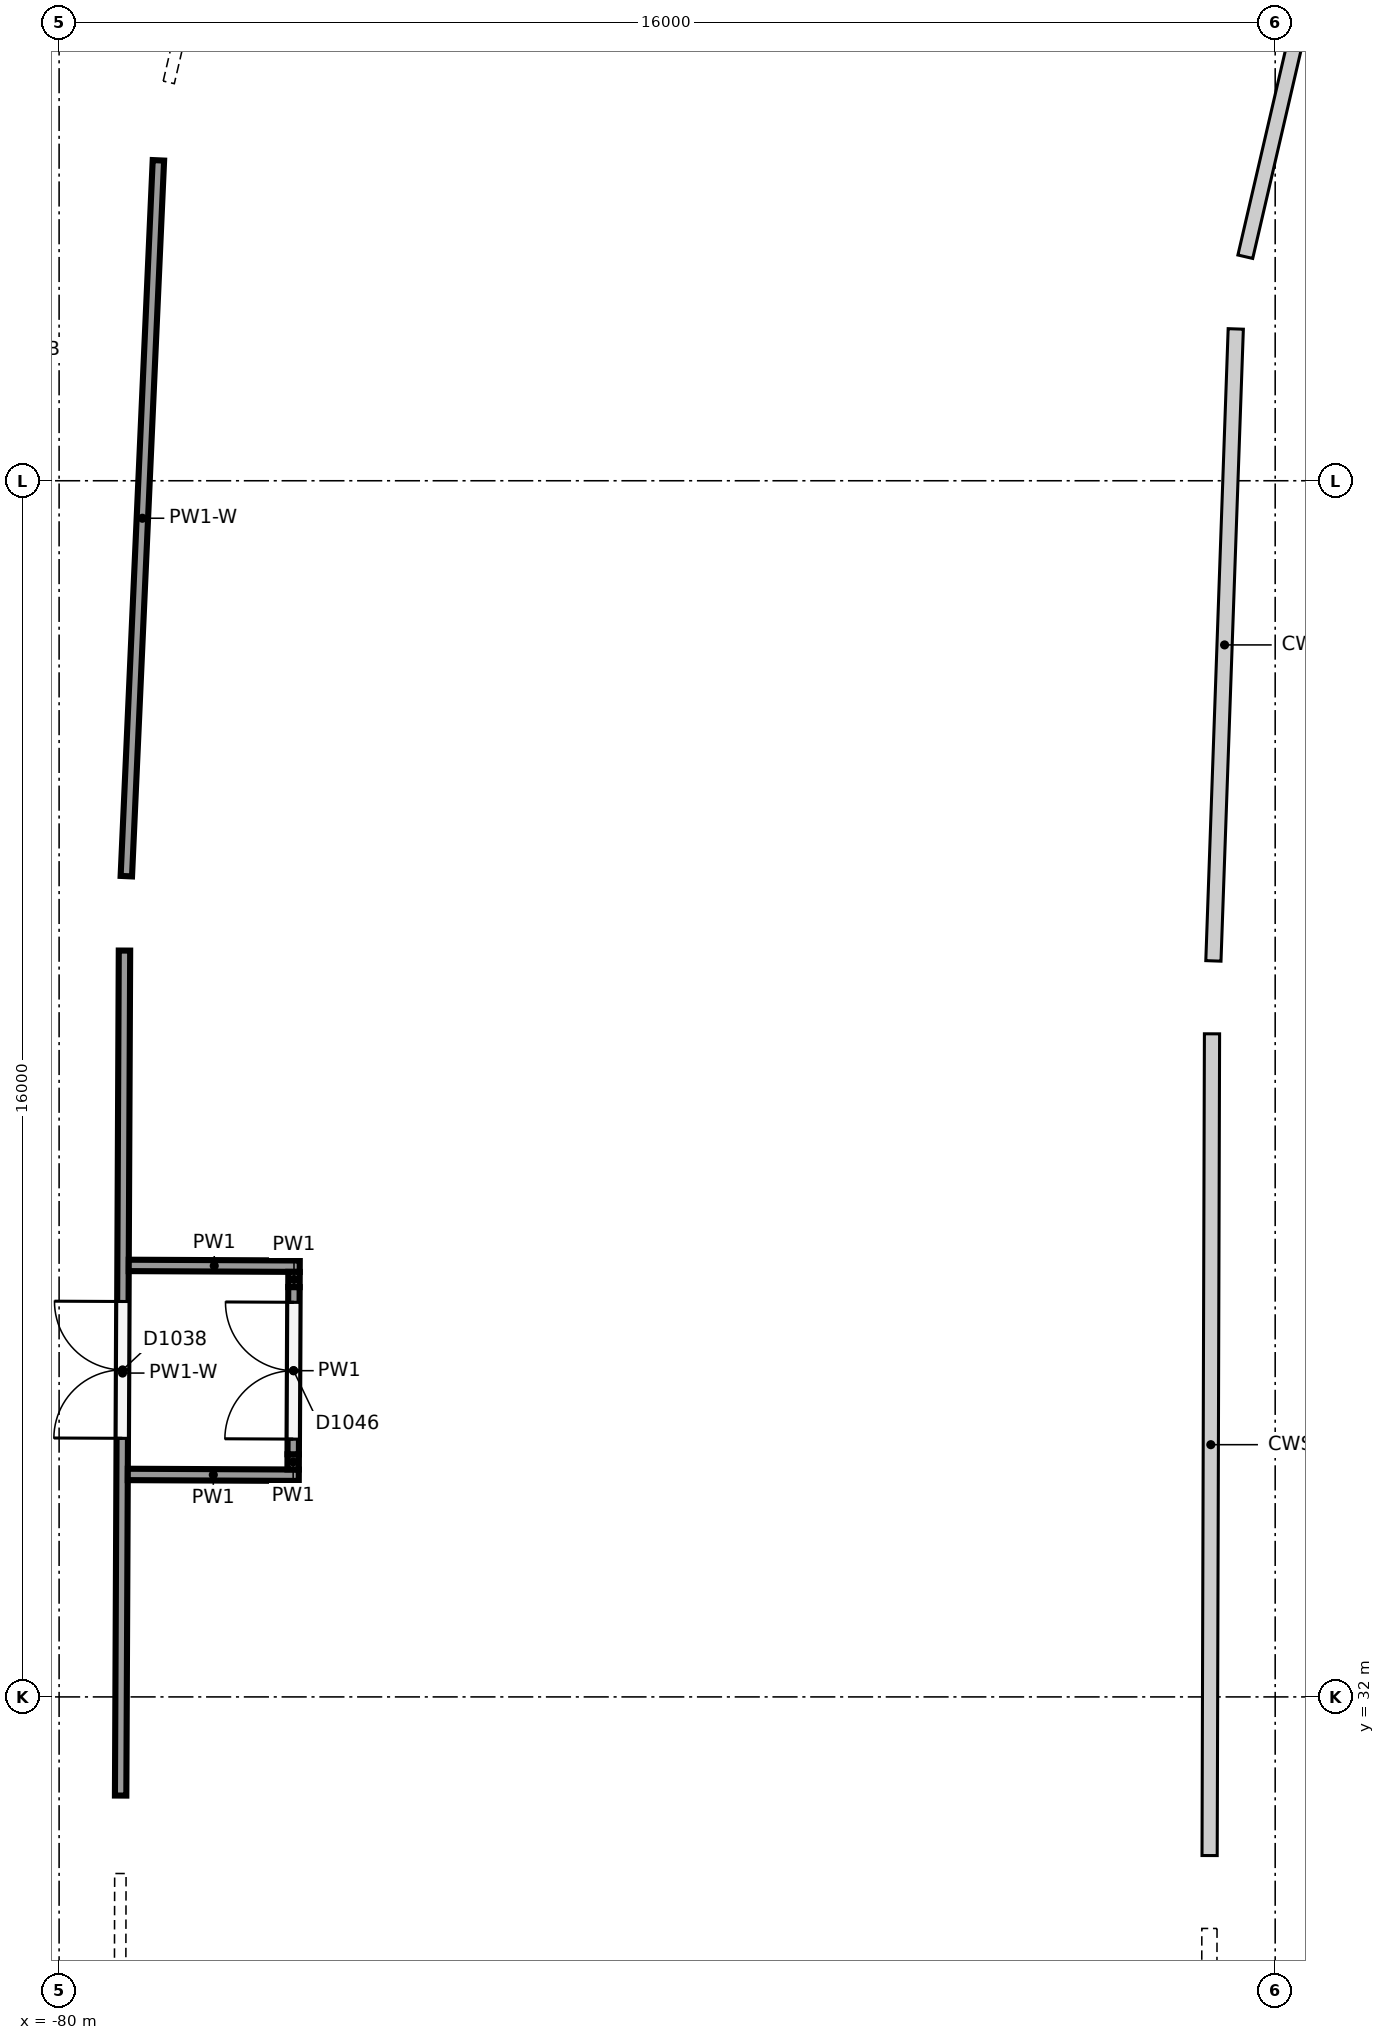
"""IFC4 building model, lengths in metres.
Left out: names, types, materials, properties, quantities, classifications, styles, units other than length and angle.
Written with IfcOpenShell. Run it as: python <this file> out.ifc"""

import sys

from ifc_helpers import new_model, si_unit, direction, frame, frame_2d, origin, origin_2d, place, context, subcontext, project, spatial, rectangle, circle, extrude, element, fill, save


model = new_model("IFC4")
c1 = context("Model", 3, precision=1e-05, world=origin(), true_north=direction((0.0, 1.0)))
c2 = subcontext(c1, "Body", "Model", "MODEL_VIEW")
j1 = project(units=[si_unit("LENGTHUNIT", "METRE"), si_unit("PLANEANGLEUNIT", "RADIAN")], contexts=[c1])
p1 = place(None, origin())
s1 = spatial("IfcSite", under=j1, at=p1, CompositionType="ELEMENT")
p2 = place(p1, origin())
s2 = spatial("IfcBuilding", under=s1, at=p2, CompositionType="ELEMENT")
p3 = place(p2, frame((0.0, 0.0, 12.0)))
s3 = spatial("IfcBuildingStorey", under=s2, at=p3, CompositionType="ELEMENT", Elevation=12.0)
p4 = place(p3, frame((-63.218, 50.273, 0.0), z_axis=(0.0, 0.0, 1.0), x_axis=(1.0, 0.0, 0.0)))
e1 = element("IfcColumn", 1, at=p4, inside=s3, PredefinedType="COLUMN", context=c2, shape_type="SweptSolid", body=[
    extrude(circle(Radius=0.45, at=origin_2d()), origin(), (0.0, 0.0, 1.0), 3.05),
])
p5 = place(p3, frame((-64.502, 50.48, 0.0), z_axis=(0.0, 0.0, 1.0), x_axis=(1.0, 0.0, 0.0)))
e2 = element("IfcColumn", 2, at=p5, inside=s3, PredefinedType="COLUMN", context=c2, shape_type="SweptSolid", body=[
    extrude(circle(Radius=0.4, at=origin_2d()), origin(), (0.0, 0.0, 1.0), 4.479),
])
p6 = place(p3, frame((-72.992, 51.847, 0.0), z_axis=(0.0, 0.0, 1.0), x_axis=(1.0, 0.0, 0.0)))
e3 = element("IfcColumn", 3, at=p6, inside=s3, PredefinedType="COLUMN", context=c2, shape_type="SweptSolid", body=[
    extrude(circle(Radius=0.45, at=origin_2d()), origin(), (0.0, 0.0, 1.0), 6.0),
])
p7 = place(p3, frame((-63.534, 41.104, 0.0), z_axis=(0.0, 0.0, 1.0), x_axis=(1.0, 0.0, 0.0)))
e4 = element("IfcColumn", 4, at=p7, inside=s3, PredefinedType="COLUMN", context=c2, shape_type="SweptSolid", body=[
    extrude(circle(Radius=0.45, at=origin_2d()), origin(), (0.0, 0.0, 1.0), 3.045),
])
p8 = place(p3, frame((-64.83, 41.204, 0.0), z_axis=(0.0, 0.0, 1.0), x_axis=(1.0, 0.0, 0.0)))
e5 = element("IfcColumn", 5, at=p8, inside=s3, PredefinedType="COLUMN", context=c2, shape_type="SweptSolid", body=[
    extrude(circle(Radius=0.4, at=origin_2d()), origin(), (0.0, 0.0, 1.0), 4.475),
])
p9 = place(p3, frame((-73.405, 41.862, 0.0), z_axis=(0.0, 0.0, 1.0), x_axis=(1.0, 0.0, 0.0)))
e6 = element("IfcColumn", 6, at=p9, inside=s3, PredefinedType="COLUMN", context=c2, shape_type="SweptSolid", body=[
    extrude(circle(Radius=0.45, at=origin_2d()), origin(), (0.0, 0.0, 1.0), 6.0),
])
p10 = place(p3, frame((-63.566, 29.362, 0.0), z_axis=(0.0, 0.0, 1.0), x_axis=(1.0, 0.0, 0.0)))
e7 = element("IfcColumn", 7, at=p10, inside=s3, PredefinedType="COLUMN", context=c2, shape_type="SweptSolid", body=[
    extrude(circle(Radius=0.45, at=origin_2d()), origin(), (0.0, 0.0, 1.0), 2.968),
])
p11 = place(p3, frame((-64.864, 29.433, 0.0), z_axis=(0.0, 0.0, 1.0), x_axis=(1.0, 0.0, 0.0)))
e8 = element("IfcColumn", 8, at=p11, inside=s3, PredefinedType="COLUMN", context=c2, shape_type="SweptSolid", body=[
    extrude(circle(Radius=0.4, at=origin_2d()), origin(), (0.0, 0.0, 1.0), 4.398),
])
p12 = place(p3, frame((-73.451, 29.904, 0.0), z_axis=(0.0, 0.0, 1.0), x_axis=(1.0, 0.0, 0.0)))
e9 = element("IfcColumn", 9, at=p12, inside=s3, PredefinedType="COLUMN", context=c2, shape_type="SweptSolid", body=[
    extrude(circle(Radius=0.45, at=origin_2d()), origin(), (0.0, 0.0, 1.0), 6.0),
])
p13 = place(p3, frame((-78.557, 53.241, 0.0), z_axis=(0.0, 0.0, 1.0), x_axis=(0.226944673482, 0.973907652284, 0.0)))
e10 = element("IfcWall", 10, at=p13, inside=s3, PredefinedType="PARTITIONING", context=c2, shape_type="SweptSolid", body=[
    extrude(rectangle(XDim=7.882, YDim=0.15, at=frame_2d((3.941, 0.0))), origin(), (0.0, 0.0, 1.0), 4.11),
])
p14 = place(p13, frame((3.45, 0.0, 0.0)))
e11 = element("IfcOpeningElement", 11, at=p14, cuts=e10, PredefinedType="OPENING", context=c2, shape_type="SweptSolid", body=[
    extrude(rectangle(XDim=1.2, YDim=2.1, at=frame_2d((0.6, 1.05))), frame((0.0, 0.085, 0.0), z_axis=(0.0, -1.0, 0.0), x_axis=(1.0, 0.0, 0.0)), (0.0, 0.0, 1.0), 0.17),
])
p15 = place(p3, frame((-79.19, 30.702, 0.0), z_axis=(0.0, 0.0, 1.0), x_axis=(0.004546006523, 0.999989666859, 0.0)))
e12 = element("IfcWall", 12, at=p15, inside=s3, PredefinedType="PARTITIONING", context=c2, shape_type="SweptSolid", body=[
    extrude(rectangle(XDim=11.117, YDim=0.15, at=frame_2d((5.558, 0.0))), origin(), (0.0, 0.0, 1.0), 3.973),
])
p16 = place(p15, frame((4.7, 0.0, 0.0)))
e13 = element("IfcOpeningElement", 13, at=p16, cuts=e12, PredefinedType="OPENING", context=c2, shape_type="SweptSolid", body=[
    extrude(rectangle(XDim=1.8, YDim=2.1, at=frame_2d((0.9, 1.05))), frame((0.0, 0.085, 0.0), z_axis=(0.0, -1.0, 0.0), x_axis=(1.0, 0.0, 0.0)), (0.0, 0.0, 1.0), 0.17),
])
p17 = place(p3, frame((-79.115, 42.798, 0.0), z_axis=(0.0, 0.0, 1.0), x_axis=(0.044750974556, 0.99899817331, 0.0)))
e14 = element("IfcWall", 14, at=p17, inside=s3, PredefinedType="PARTITIONING", context=c2, shape_type="SweptSolid", body=[
    extrude(rectangle(XDim=9.427, YDim=0.15, at=frame_2d((4.714, 0.0))), origin(), (0.0, 0.0, 1.0), 3.973),
])
p18 = place(p3, frame((-79.219, 18.845, 0.0), z_axis=(0.0, 0.0, 1.0), x_axis=(0.002254023351, 0.999997459686, 0.0)))
e15 = element("IfcWall", 15, at=p18, inside=s3, PredefinedType="PARTITIONING", context=c2, shape_type="SweptSolid", body=[
    extrude(rectangle(XDim=10.831, YDim=0.15, at=frame_2d((5.416, 0.0))), origin(), (0.0, 0.0, 1.0), 4.124),
])
p19 = place(p3, frame((-81.513, 47.012, 0.0), z_axis=(0.0, 0.0, 1.0), x_axis=(0.111965089533, 0.993712140776, 0.0)))
e16 = element("IfcWall", 16, at=p19, inside=s3, PredefinedType="PARTITIONING", context=c2, shape_type="SweptSolid", body=[
    extrude(rectangle(XDim=13.89, YDim=0.15, at=frame_2d((6.945, 0.0))), origin(), (0.0, 0.0, 1.0), 4.55),
])
p20 = place(p19, frame((7.75, 0.0, 0.0)))
e17 = element("IfcOpeningElement", 17, at=p20, cuts=e16, PredefinedType="OPENING", context=c2, shape_type="SweptSolid", body=[
    extrude(rectangle(XDim=1.8, YDim=2.1, at=frame_2d((0.9, 1.05))), frame((0.0, 0.085, 0.0), z_axis=(0.0, -1.0, 0.0), x_axis=(1.0, 0.0, 0.0)), (0.0, 0.0, 1.0), 0.17),
])
for number, where, z_axis, x_axis in (
    (18, (-79.096, 34.927, 0.0), (0.0, 0.0, 1.0), (1.0, -0.005, 0.0)),
    (19, (-79.084, 37.677, 0.0), (0.0, 0.0, 1.0), (1.0, -0.005, 0.0)),
):
    element("IfcWall", number, at=place(p3, frame(where, z_axis=z_axis, x_axis=x_axis)), inside=s3, PredefinedType="PARTITIONING", context=c2, shape_type="SweptSolid", body=[
        extrude(rectangle(XDim=2.25, YDim=0.15, at=frame_2d((1.125, 0.0))), origin(), (0.0, 0.0, 1.0), 5.65),
    ])
p21 = place(p3, frame((-76.921, 34.992, 0.0), z_axis=(0.0, 0.0, 1.0), x_axis=(0.003662979089, 0.99999329127, 0.0)))
e20 = element("IfcWall", 20, at=p21, inside=s3, PredefinedType="PARTITIONING", context=c2, shape_type="SweptSolid", body=[
    extrude(rectangle(XDim=0.2, YDim=0.15, at=frame_2d((0.1, 0.0))), origin(), (0.0, 0.0, 1.0), 5.65),
])
p22 = place(p3, frame((-76.92, 35.192, 0.0), z_axis=(0.0, 0.0, 1.0), x_axis=(0.004549947354, 0.999989648936, 0.0)))
e21 = element("IfcWall", 21, at=p22, inside=s3, PredefinedType="PARTITIONING", context=c2, shape_type="SweptSolid", body=[
    extrude(rectangle(XDim=2.2, YDim=0.15, at=frame_2d((1.1, 0.0))), origin(), (0.0, 0.0, 1.0), 5.65),
])
p23 = place(p22, frame((0.2, 0.0, 0.0)))
e22 = element("IfcOpeningElement", 22, at=p23, cuts=e21, PredefinedType="OPENING", context=c2, shape_type="SweptSolid", body=[
    extrude(rectangle(XDim=1.8, YDim=2.1, at=frame_2d((0.9, 1.05))), frame((0.0, 0.085, 0.0), z_axis=(0.0, -1.0, 0.0), x_axis=(1.0, 0.0, 0.0)), (0.0, 0.0, 1.0), 0.17),
])
p24 = place(p3, frame((-76.91, 37.392, 0.0), z_axis=(0.0, 0.0, 1.0), x_axis=(0.004883946635, 0.999988073462, 0.0)))
e23 = element("IfcWall", 23, at=p24, inside=s3, PredefinedType="PARTITIONING", context=c2, shape_type="SweptSolid", body=[
    extrude(rectangle(XDim=0.2, YDim=0.15, at=frame_2d((0.1, 0.0))), origin(), (0.0, 0.0, 1.0), 5.65),
])
p25 = place(p16, origin())
e24 = element("IfcDoor", 24, at=p25, inside=s3, OperationType="DOUBLE_DOOR_SINGLE_SWING", PredefinedType="DOOR", context=c2, shape_type="SweptSolid", body=[
    extrude(rectangle(XDim=1.8, YDim=2.1, at=frame_2d((0.9, 1.05))), frame((0.0, 0.025, 0.0), z_axis=(0.0, -1.0, 0.0), x_axis=(1.0, 0.0, 0.0)), (0.0, 0.0, 1.0), 0.05),
])
fill(e13, e24)
p26 = place(p23, origin())
e25 = element("IfcDoor", 25, at=p26, inside=s3, OperationType="DOUBLE_DOOR_SINGLE_SWING", PredefinedType="DOOR", context=c2, shape_type="SweptSolid", body=[
    extrude(rectangle(XDim=1.8, YDim=2.1, at=frame_2d((0.9, 1.05))), frame((0.0, 0.025, 0.0), z_axis=(0.0, -1.0, 0.0), x_axis=(1.0, 0.0, 0.0)), (0.0, 0.0, 1.0), 0.05),
])
fill(e22, e25)
save(model, sys.argv[1])
